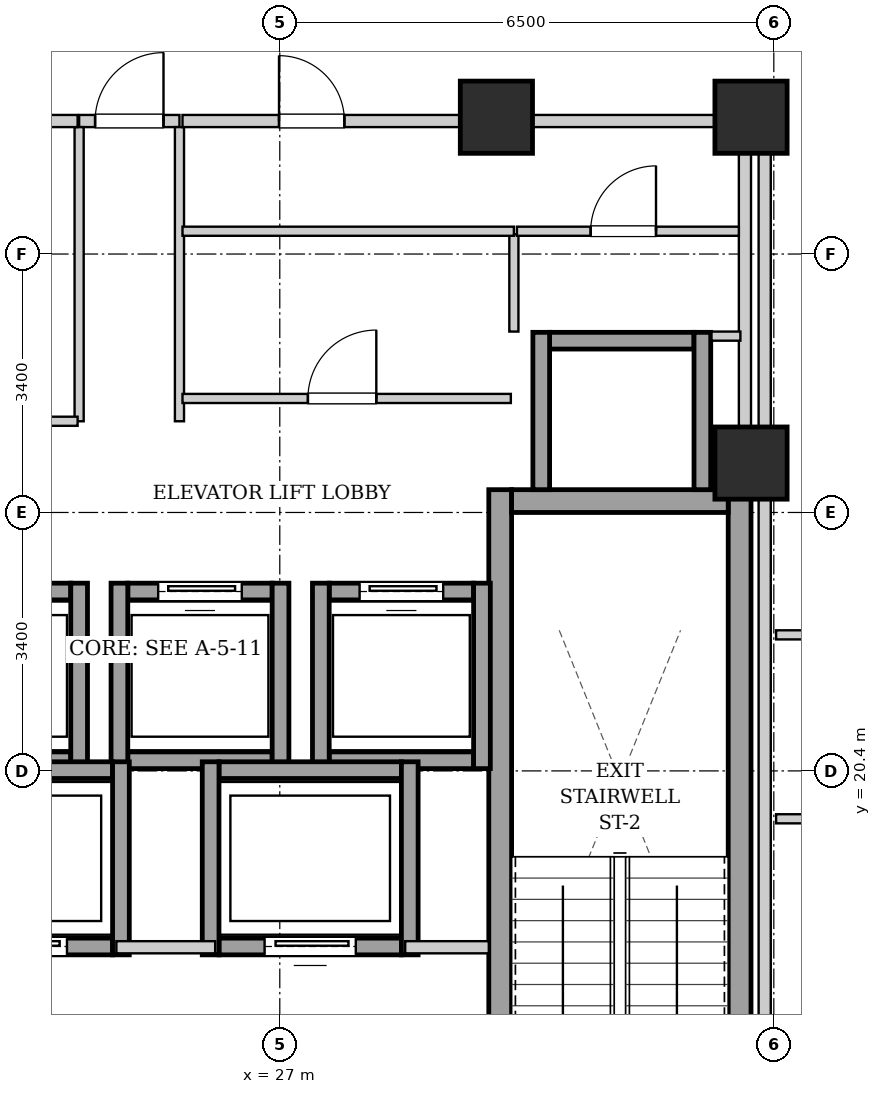
"""IFC4 building model, lengths in metres.
Left out: names, types, materials, properties, quantities, classifications, styles, units other than length and angle.
Written with IfcOpenShell. Run it as: python <this file> out.ifc"""

import sys

from ifc_helpers import new_model, si_unit, direction, frame, frame_2d, origin, origin_2d, place, context, subcontext, project, spatial, rectangle, extrude, element, fill, save


model = new_model("IFC4")
c1 = context("Model", 3, precision=1e-05, world=origin(), true_north=direction((0.0, 1.0)))
c2 = subcontext(c1, "Body", "Model", "MODEL_VIEW")
j1 = project(units=[si_unit("LENGTHUNIT", "METRE"), si_unit("PLANEANGLEUNIT", "RADIAN")], contexts=[c1])
p1 = place(None, origin())
s1 = spatial("IfcSite", under=j1, at=p1, CompositionType="ELEMENT")
p2 = place(p1, origin())
s2 = spatial("IfcBuilding", under=s1, at=p2, CompositionType="ELEMENT")
p3 = place(p2, frame((0.0, 0.0, 140.65)))
s3 = spatial("IfcBuildingStorey", under=s2, at=p3, CompositionType="ELEMENT", Elevation=140.65)
for number, where, z_axis, x_axis in (
    (1, (29.85, 29.0, 0.0), (0.0, 0.0, 1.0), (1.0, 0.0, 0.0)),
    (2, (33.2, 29.0, 0.0), (0.0, 0.0, 1.0), (1.0, 0.0, 0.0)),
    (3, (33.2, 24.45, 0.0), (0.0, 0.0, 1.0), (1.0, 0.0, 0.0)),
):
    element("IfcColumn", number, at=place(p3, frame(where, z_axis=z_axis, x_axis=x_axis)), inside=s3, PredefinedType="COLUMN", context=c2, shape_type="SweptSolid", body=[
        extrude(rectangle(XDim=0.95, YDim=0.95, at=origin_2d()), origin(), (0.0, 0.0, 1.0), 3.25),
    ])
for number, where, z_axis, x_axis in (
    (4, (29.9, 15.1, 0.0), (0.0, 0.0, 1.0), (0.0, 1.0, 0.0)),
    (5, (33.05, 15.1, 0.0), (0.0, 0.0, 1.0), (0.0, 1.0, 0.0)),
):
    element("IfcWall", number, at=place(p3, frame(where, z_axis=z_axis, x_axis=x_axis)), inside=s3, PredefinedType="SHEAR", context=c2, shape_type="SweptSolid", body=[
        extrude(rectangle(XDim=9.0, YDim=0.3, at=frame_2d((4.5, 0.0))), origin(), (0.0, 0.0, 1.0), 2.99),
    ])
p4 = place(p3, frame((30.05, 23.95, 0.0), z_axis=(0.0, 0.0, 1.0), x_axis=(1.0, 0.0, 0.0)))
e6 = element("IfcWall", 6, at=p4, inside=s3, PredefinedType="SHEAR", context=c2, shape_type="SweptSolid", body=[
    extrude(rectangle(XDim=2.85, YDim=0.3, at=frame_2d((1.425, 0.0))), origin(), (0.0, 0.0, 1.0), 2.99),
])
p5 = place(p3, frame((22.35, 20.54, 0.0), z_axis=(0.0, 0.0, 1.0), x_axis=(1.0, 0.0, 0.0)))
e7 = element("IfcWall", 7, at=p5, inside=s3, PredefinedType="SHEAR", context=c2, shape_type="SweptSolid", body=[
    extrude(rectangle(XDim=1.9, YDim=0.22, at=frame_2d((0.95, 0.0))), origin(), (0.0, 0.0, 1.0), 2.99),
])
p6 = place(p3, frame((22.35, 22.76, 0.0), z_axis=(0.0, 0.0, 1.0), x_axis=(1.0, 0.0, 0.0)))
e8 = element("IfcWall", 8, at=p6, inside=s3, PredefinedType="SHEAR", context=c2, shape_type="SweptSolid", body=[
    extrude(rectangle(XDim=1.9, YDim=0.22, at=frame_2d((0.95, 0.0))), origin(), (0.0, 0.0, 1.0), 2.99),
])
p7 = place(p6, frame((0.4, 0.0, 0.0)))
e9 = element("IfcOpeningElement", 9, at=p7, cuts=e8, PredefinedType="OPENING", context=c2, shape_type="SweptSolid", body=[
    extrude(rectangle(XDim=1.1, YDim=2.15, at=frame_2d((0.55, 1.075))), frame((0.0, 0.12, 0.0), z_axis=(0.0, -1.0, 0.0), x_axis=(1.0, 0.0, 0.0)), (0.0, 0.0, 1.0), 0.24),
])
p8 = place(p3, frame((24.36, 20.43, 0.0), z_axis=(0.0, 0.0, 1.0), x_axis=(0.0, 1.0, 0.0)))
e10 = element("IfcWall", 10, at=p8, inside=s3, PredefinedType="SHEAR", context=c2, shape_type="SweptSolid", body=[
    extrude(rectangle(XDim=2.44, YDim=0.22, at=frame_2d((1.22, 0.0))), origin(), (0.0, 0.0, 1.0), 2.99),
])
p9 = place(p3, frame((25.0, 20.54, 0.0), z_axis=(0.0, 0.0, 1.0), x_axis=(1.0, 0.0, 0.0)))
e11 = element("IfcWall", 11, at=p9, inside=s3, PredefinedType="SHEAR", context=c2, shape_type="SweptSolid", body=[
    extrude(rectangle(XDim=1.9, YDim=0.22, at=frame_2d((0.95, 0.0))), origin(), (0.0, 0.0, 1.0), 2.99),
])
p10 = place(p3, frame((25.0, 22.76, 0.0), z_axis=(0.0, 0.0, 1.0), x_axis=(1.0, 0.0, 0.0)))
e12 = element("IfcWall", 12, at=p10, inside=s3, PredefinedType="SHEAR", context=c2, shape_type="SweptSolid", body=[
    extrude(rectangle(XDim=1.9, YDim=0.22, at=frame_2d((0.95, 0.0))), origin(), (0.0, 0.0, 1.0), 2.99),
])
p11 = place(p10, frame((0.4, 0.0, 0.0)))
e13 = element("IfcOpeningElement", 13, at=p11, cuts=e12, PredefinedType="OPENING", context=c2, shape_type="SweptSolid", body=[
    extrude(rectangle(XDim=1.1, YDim=2.15, at=frame_2d((0.55, 1.075))), frame((0.0, 0.12, 0.0), z_axis=(0.0, -1.0, 0.0), x_axis=(1.0, 0.0, 0.0)), (0.0, 0.0, 1.0), 0.24),
])
for number, where, z_axis, x_axis in (
    (14, (24.89, 20.43, 0.0), (0.0, 0.0, 1.0), (0.0, 1.0, 0.0)),
    (15, (27.01, 20.43, 0.0), (0.0, 0.0, 1.0), (0.0, 1.0, 0.0)),
):
    element("IfcWall", number, at=place(p3, frame(where, z_axis=z_axis, x_axis=x_axis)), inside=s3, PredefinedType="SHEAR", context=c2, shape_type="SweptSolid", body=[
        extrude(rectangle(XDim=2.44, YDim=0.22, at=frame_2d((1.22, 0.0))), origin(), (0.0, 0.0, 1.0), 2.99),
    ])
p12 = place(p3, frame((27.65, 20.54, 0.0), z_axis=(0.0, 0.0, 1.0), x_axis=(1.0, 0.0, 0.0)))
e16 = element("IfcWall", 16, at=p12, inside=s3, PredefinedType="SHEAR", context=c2, shape_type="SweptSolid", body=[
    extrude(rectangle(XDim=1.9, YDim=0.22, at=frame_2d((0.95, 0.0))), origin(), (0.0, 0.0, 1.0), 2.99),
])
p13 = place(p3, frame((27.65, 22.76, 0.0), z_axis=(0.0, 0.0, 1.0), x_axis=(1.0, 0.0, 0.0)))
e17 = element("IfcWall", 17, at=p13, inside=s3, PredefinedType="SHEAR", context=c2, shape_type="SweptSolid", body=[
    extrude(rectangle(XDim=1.9, YDim=0.22, at=frame_2d((0.95, 0.0))), origin(), (0.0, 0.0, 1.0), 2.99),
])
p14 = place(p13, frame((0.4, 0.0, 0.0)))
e18 = element("IfcOpeningElement", 18, at=p14, cuts=e17, PredefinedType="OPENING", context=c2, shape_type="SweptSolid", body=[
    extrude(rectangle(XDim=1.1, YDim=2.15, at=frame_2d((0.55, 1.075))), frame((0.0, 0.12, 0.0), z_axis=(0.0, -1.0, 0.0), x_axis=(1.0, 0.0, 0.0)), (0.0, 0.0, 1.0), 0.24),
])
for number, where, z_axis, x_axis in (
    (19, (27.54, 20.43, 0.0), (0.0, 0.0, 1.0), (0.0, 1.0, 0.0)),
    (20, (29.66, 20.43, 0.0), (0.0, 0.0, 1.0), (0.0, 1.0, 0.0)),
):
    element("IfcWall", number, at=place(p3, frame(where, z_axis=z_axis, x_axis=x_axis)), inside=s3, PredefinedType="SHEAR", context=c2, shape_type="SweptSolid", body=[
        extrude(rectangle(XDim=2.44, YDim=0.22, at=frame_2d((1.22, 0.0))), origin(), (0.0, 0.0, 1.0), 2.99),
    ])
p15 = place(p3, frame((30.55, 26.06, 0.0), z_axis=(0.0, 0.0, 1.0), x_axis=(1.0, 0.0, 0.0)))
e21 = element("IfcWall", 21, at=p15, inside=s3, PredefinedType="SHEAR", context=c2, shape_type="SweptSolid", body=[
    extrude(rectangle(XDim=1.9, YDim=0.22, at=frame_2d((0.95, 0.0))), origin(), (0.0, 0.0, 1.0), 2.99),
])
for number, where, z_axis, x_axis in (
    (22, (30.44, 24.1, 0.0), (0.0, 0.0, 1.0), (0.0, 1.0, 0.0)),
    (23, (32.56, 24.1, 0.0), (0.0, 0.0, 1.0), (0.0, 1.0, 0.0)),
):
    element("IfcWall", number, at=place(p3, frame(where, z_axis=z_axis, x_axis=x_axis)), inside=s3, PredefinedType="SHEAR", context=c2, shape_type="SweptSolid", body=[
        extrude(rectangle(XDim=2.07, YDim=0.22, at=frame_2d((1.035, 0.0))), origin(), (0.0, 0.0, 1.0), 2.99),
    ])
p16 = place(p3, frame((22.4, 18.09, 0.0), z_axis=(0.0, 0.0, 1.0), x_axis=(1.0, 0.0, 0.0)))
e24 = element("IfcWall", 24, at=p16, inside=s3, PredefinedType="SHEAR", context=c2, shape_type="SweptSolid", body=[
    extrude(rectangle(XDim=2.4, YDim=0.22, at=frame_2d((1.2, 0.0))), origin(), (0.0, 0.0, 1.0), 2.99),
])
p17 = place(p16, frame((0.6, 0.0, 0.0)))
e25 = element("IfcOpeningElement", 25, at=p17, cuts=e24, PredefinedType="OPENING", context=c2, shape_type="SweptSolid", body=[
    extrude(rectangle(XDim=1.2, YDim=2.15, at=frame_2d((0.6, 1.075))), frame((0.0, 0.12, 0.0), z_axis=(0.0, -1.0, 0.0), x_axis=(1.0, 0.0, 0.0)), (0.0, 0.0, 1.0), 0.24),
])
p18 = place(p3, frame((22.4, 20.41, 0.0), z_axis=(0.0, 0.0, 1.0), x_axis=(1.0, 0.0, 0.0)))
e26 = element("IfcWall", 26, at=p18, inside=s3, PredefinedType="SHEAR", context=c2, shape_type="SweptSolid", body=[
    extrude(rectangle(XDim=2.4, YDim=0.22, at=frame_2d((1.2, 0.0))), origin(), (0.0, 0.0, 1.0), 2.99),
])
p19 = place(p3, frame((24.91, 17.98, 0.0), z_axis=(0.0, 0.0, 1.0), x_axis=(0.0, 1.0, 0.0)))
e27 = element("IfcWall", 27, at=p19, inside=s3, PredefinedType="SHEAR", context=c2, shape_type="SweptSolid", body=[
    extrude(rectangle(XDim=2.54, YDim=0.22, at=frame_2d((1.27, 0.0))), origin(), (0.0, 0.0, 1.0), 2.99),
])
p20 = place(p3, frame((26.2, 18.09, 0.0), z_axis=(0.0, 0.0, 1.0), x_axis=(1.0, 0.0, 0.0)))
e28 = element("IfcWall", 28, at=p20, inside=s3, PredefinedType="SHEAR", context=c2, shape_type="SweptSolid", body=[
    extrude(rectangle(XDim=2.4, YDim=0.22, at=frame_2d((1.2, 0.0))), origin(), (0.0, 0.0, 1.0), 2.99),
])
p21 = place(p20, frame((0.6, 0.0, 0.0)))
e29 = element("IfcOpeningElement", 29, at=p21, cuts=e28, PredefinedType="OPENING", context=c2, shape_type="SweptSolid", body=[
    extrude(rectangle(XDim=1.2, YDim=2.15, at=frame_2d((0.6, 1.075))), frame((0.0, 0.12, 0.0), z_axis=(0.0, -1.0, 0.0), x_axis=(1.0, 0.0, 0.0)), (0.0, 0.0, 1.0), 0.24),
])
p22 = place(p3, frame((26.2, 20.41, 0.0), z_axis=(0.0, 0.0, 1.0), x_axis=(1.0, 0.0, 0.0)))
e30 = element("IfcWall", 30, at=p22, inside=s3, PredefinedType="SHEAR", context=c2, shape_type="SweptSolid", body=[
    extrude(rectangle(XDim=2.4, YDim=0.22, at=frame_2d((1.2, 0.0))), origin(), (0.0, 0.0, 1.0), 2.99),
])
for number, where, z_axis, x_axis in (
    (31, (26.09, 17.98, 0.0), (0.0, 0.0, 1.0), (0.0, 1.0, 0.0)),
    (32, (28.71, 17.98, 0.0), (0.0, 0.0, 1.0), (0.0, 1.0, 0.0)),
):
    element("IfcWall", number, at=place(p3, frame(where, z_axis=z_axis, x_axis=x_axis)), inside=s3, PredefinedType="SHEAR", context=c2, shape_type="SweptSolid", body=[
        extrude(rectangle(XDim=2.54, YDim=0.22, at=frame_2d((1.27, 0.0))), origin(), (0.0, 0.0, 1.0), 2.99),
    ])
p23 = place(p3, frame((24.85, 18.08, 0.0), z_axis=(0.0, 0.0, 1.0), x_axis=(1.0, 0.0, 0.0)))
e33 = element("IfcWall", 33, at=p23, inside=s3, PredefinedType="PARTITIONING", context=c2, shape_type="SweptSolid", body=[
    extrude(rectangle(XDim=1.3, YDim=0.16, at=frame_2d((0.65, 0.0))), origin(), (0.0, 0.0, 1.0), 2.99),
])
p24 = place(p3, frame((28.65, 18.08, 0.0), z_axis=(0.0, 0.0, 1.0), x_axis=(1.0, 0.0, 0.0)))
e34 = element("IfcWall", 34, at=p24, inside=s3, PredefinedType="PARTITIONING", context=c2, shape_type="SweptSolid", body=[
    extrude(rectangle(XDim=1.1, YDim=0.16, at=frame_2d((0.55, 0.0))), origin(), (0.0, 0.0, 1.0), 2.99),
])
p25 = place(p3, frame((33.12, 24.12, 0.0), z_axis=(0.0, 0.0, 1.0), x_axis=(0.0, 1.0, 0.0)))
e35 = element("IfcWall", 35, at=p25, inside=s3, PredefinedType="PARTITIONING", context=c2, shape_type="SweptSolid", body=[
    extrude(rectangle(XDim=4.76, YDim=0.16, at=frame_2d((2.38, 0.0))), origin(), (0.0, 0.0, 1.0), 2.99),
])
p26 = place(p3, frame((24.36, 28.95, 0.0), z_axis=(0.0, 0.0, 1.0), x_axis=(1.0, 0.0, 0.0)))
e36 = element("IfcWall", 36, at=p26, inside=s3, PredefinedType="PARTITIONING", context=c2, shape_type="SweptSolid", body=[
    extrude(rectangle(XDim=1.32, YDim=0.16, at=frame_2d((0.66, 0.0))), origin(), (0.0, 0.0, 1.0), 2.426),
])
p27 = place(p26, frame((0.21, 0.0, 0.0)))
e37 = element("IfcOpeningElement", 37, at=p27, cuts=e36, PredefinedType="OPENING", context=c2, shape_type="SweptSolid", body=[
    extrude(rectangle(XDim=0.9, YDim=2.05, at=frame_2d((0.45, 1.025))), frame((0.0, 0.09, 0.0), z_axis=(0.0, -1.0, 0.0), x_axis=(1.0, 0.0, 0.0)), (0.0, 0.0, 1.0), 0.18),
])
for number, where, z_axis, x_axis in (
    (38, (24.36, 25.0, 0.0), (0.0, 0.0, 1.0), (0.0, 1.0, 0.0)),
    (39, (25.68, 25.0, 0.0), (0.0, 0.0, 1.0), (0.0, 1.0, 0.0)),
):
    element("IfcWall", number, at=place(p3, frame(where, z_axis=z_axis, x_axis=x_axis)), inside=s3, PredefinedType="PARTITIONING", context=c2, shape_type="SweptSolid", body=[
        extrude(rectangle(XDim=3.87, YDim=0.12, at=frame_2d((1.935, 0.0))), origin(), (0.0, 0.0, 1.0), 2.99),
    ])
p28 = place(p3, frame((30.08, 26.18, 0.0), z_axis=(0.0, 0.0, 1.0), x_axis=(0.0, 1.0, 0.0)))
e40 = element("IfcWall", 40, at=p28, inside=s3, PredefinedType="PARTITIONING", context=c2, shape_type="SweptSolid", body=[
    extrude(rectangle(XDim=1.28, YDim=0.12, at=frame_2d((0.64, 0.0))), origin(), (0.0, 0.0, 1.0), 2.99),
])
p29 = place(p3, frame((32.68, 26.12, 0.0), z_axis=(0.0, 0.0, 1.0), x_axis=(1.0, 0.0, 0.0)))
e41 = element("IfcWall", 41, at=p29, inside=s3, PredefinedType="PARTITIONING", context=c2, shape_type="SweptSolid", body=[
    extrude(rectangle(XDim=0.38, YDim=0.12, at=frame_2d((0.19, 0.0))), origin(), (0.0, 0.0, 1.0), 2.99),
])
p30 = place(p3, frame((30.12, 27.5, 0.0), z_axis=(0.0, 0.0, 1.0), x_axis=(1.0, 0.0, 0.0)))
e42 = element("IfcWall", 42, at=p30, inside=s3, PredefinedType="PARTITIONING", context=c2, shape_type="SweptSolid", body=[
    extrude(rectangle(XDim=2.92, YDim=0.12, at=frame_2d((1.46, 0.0))), origin(), (0.0, 0.0, 1.0), 2.99),
])
p31 = place(p30, frame((0.97, 0.0, 0.0)))
e43 = element("IfcOpeningElement", 43, at=p31, cuts=e42, PredefinedType="OPENING", context=c2, shape_type="SweptSolid", body=[
    extrude(rectangle(XDim=0.86, YDim=2.05, at=frame_2d((0.43, 1.025))), frame((0.0, 0.07, 0.0), z_axis=(0.0, -1.0, 0.0), x_axis=(1.0, 0.0, 0.0)), (0.0, 0.0, 1.0), 0.14),
])
p32 = place(p3, frame((22.3, 25.0, 0.0), z_axis=(0.0, 0.0, 1.0), x_axis=(1.0, 0.0, 0.0)))
e44 = element("IfcWall", 44, at=p32, inside=s3, PredefinedType="PARTITIONING", context=c2, shape_type="SweptSolid", body=[
    extrude(rectangle(XDim=2.04, YDim=0.12, at=frame_2d((1.02, 0.0))), origin(), (0.0, 0.0, 1.0), 2.99),
])
p33 = place(p3, frame((22.28, 28.95, 0.0), z_axis=(0.0, 0.0, 1.0), x_axis=(1.0, 0.0, 0.0)))
e45 = element("IfcWall", 45, at=p33, inside=s3, PredefinedType="PARTITIONING", context=c2, shape_type="SweptSolid", body=[
    extrude(rectangle(XDim=2.06, YDim=0.16, at=frame_2d((1.03, 0.0))), origin(), (0.0, 0.0, 1.0), 2.426),
])
p34 = place(p33, frame((0.62, 0.0, 0.0)))
e46 = element("IfcOpeningElement", 46, at=p34, cuts=e45, PredefinedType="OPENING", context=c2, shape_type="SweptSolid", body=[
    extrude(rectangle(XDim=0.86, YDim=2.05, at=frame_2d((0.43, 1.025))), frame((0.0, 0.09, 0.0), z_axis=(0.0, -1.0, 0.0), x_axis=(1.0, 0.0, 0.0)), (0.0, 0.0, 1.0), 0.18),
])
p35 = place(p3, frame((25.72, 27.5, 0.0), z_axis=(0.0, 0.0, 1.0), x_axis=(1.0, 0.0, 0.0)))
e47 = element("IfcWall", 47, at=p35, inside=s3, PredefinedType="PARTITIONING", context=c2, shape_type="SweptSolid", body=[
    extrude(rectangle(XDim=4.36, YDim=0.12, at=frame_2d((2.18, 0.0))), origin(), (0.0, 0.0, 1.0), 2.99),
])
p36 = place(p3, frame((25.72, 25.3, 0.0), z_axis=(0.0, 0.0, 1.0), x_axis=(1.0, 0.0, 0.0)))
e48 = element("IfcWall", 48, at=p36, inside=s3, PredefinedType="PARTITIONING", context=c2, shape_type="SweptSolid", body=[
    extrude(rectangle(XDim=4.32, YDim=0.12, at=frame_2d((2.16, 0.0))), origin(), (0.0, 0.0, 1.0), 2.99),
])
p37 = place(p36, frame((1.65, 0.0, 0.0)))
e49 = element("IfcOpeningElement", 49, at=p37, cuts=e48, PredefinedType="OPENING", context=c2, shape_type="SweptSolid", body=[
    extrude(rectangle(XDim=0.9, YDim=2.05, at=frame_2d((0.45, 1.025))), frame((0.0, 0.07, 0.0), z_axis=(0.0, -1.0, 0.0), x_axis=(1.0, 0.0, 0.0)), (0.0, 0.0, 1.0), 0.14),
])
p38 = place(p3, frame((25.72, 28.95, 0.0), z_axis=(0.0, 0.0, 1.0), x_axis=(1.0, 0.0, 0.0)))
e50 = element("IfcWall", 50, at=p38, inside=s3, PredefinedType="PARTITIONING", context=c2, shape_type="SweptSolid", body=[
    extrude(rectangle(XDim=7.32, YDim=0.16, at=frame_2d((3.66, 0.0))), origin(), (0.0, 0.0, 1.0), 2.426),
])
p39 = place(p38, frame((1.27, 0.0, 0.0)))
e51 = element("IfcOpeningElement", 51, at=p39, cuts=e50, PredefinedType="OPENING", context=c2, shape_type="SweptSolid", body=[
    extrude(rectangle(XDim=0.86, YDim=2.05, at=frame_2d((0.43, 1.025))), frame((0.0, 0.09, 0.0), z_axis=(0.0, -1.0, 0.0), x_axis=(1.0, 0.0, 0.0)), (0.0, 0.0, 1.0), 0.18),
])
p40 = place(p3, frame((33.53, 22.19, 0.0), z_axis=(0.0, 0.0, 1.0), x_axis=(1.0, 0.0, 0.0)))
e52 = element("IfcWall", 52, at=p40, inside=s3, PredefinedType="PARTITIONING", context=c2, shape_type="SweptSolid", body=[
    extrude(rectangle(XDim=2.45, YDim=0.12, at=frame_2d((1.225, 0.0))), origin(), (0.0, 0.0, 1.0), 2.99),
])
p41 = place(p3, frame((33.53, 19.77, 0.0), z_axis=(0.0, 0.0, 1.0), x_axis=(1.0, 0.0, 0.0)))
e53 = element("IfcWall", 53, at=p41, inside=s3, PredefinedType="PARTITIONING", context=c2, shape_type="SweptSolid", body=[
    extrude(rectangle(XDim=2.45, YDim=0.12, at=frame_2d((1.225, 0.0))), origin(), (0.0, 0.0, 1.0), 2.99),
])
p42 = place(p41, frame((0.795, 0.0, 0.0)))
e54 = element("IfcOpeningElement", 54, at=p42, cuts=e53, PredefinedType="OPENING", context=c2, shape_type="SweptSolid", body=[
    extrude(rectangle(XDim=0.86, YDim=2.05, at=frame_2d((0.43, 1.025))), frame((0.0, 0.07, 0.0), z_axis=(0.0, -1.0, 0.0), x_axis=(1.0, 0.0, 0.0)), (0.0, 0.0, 1.0), 0.14),
])
p43 = place(p3, frame((33.38, 15.02, 0.0), z_axis=(0.0, 0.0, 1.0), x_axis=(0.0, 1.0, 0.0)))
e55 = element("IfcWall", 55, at=p43, inside=s3, PredefinedType="PARTITIONING", context=c2, shape_type="SweptSolid", body=[
    extrude(rectangle(XDim=13.98, YDim=0.16, at=frame_2d((6.99, 0.0))), origin(), (0.0, 0.0, 1.0), 2.99),
])
p44 = place(p11, origin())
e56 = element("IfcDoor", 56, at=p44, inside=s3, OperationType="SLIDING_TO_LEFT", PredefinedType="DOOR", context=c2, shape_type="SweptSolid", body=[
    extrude(rectangle(XDim=1.1, YDim=2.15, at=frame_2d((0.55, 1.075))), frame((0.0, 0.025, 0.0), z_axis=(0.0, -1.0, 0.0), x_axis=(1.0, 0.0, 0.0)), (0.0, 0.0, 1.0), 0.05),
])
fill(e13, e56)
p45 = place(p14, origin())
e57 = element("IfcDoor", 57, at=p45, inside=s3, OperationType="SLIDING_TO_LEFT", PredefinedType="DOOR", context=c2, shape_type="SweptSolid", body=[
    extrude(rectangle(XDim=1.1, YDim=2.15, at=frame_2d((0.55, 1.075))), frame((0.0, 0.025, 0.0), z_axis=(0.0, -1.0, 0.0), x_axis=(1.0, 0.0, 0.0)), (0.0, 0.0, 1.0), 0.05),
])
fill(e18, e57)
p46 = place(p17, origin())
e58 = element("IfcDoor", 58, at=p46, inside=s3, OperationType="SLIDING_TO_LEFT", PredefinedType="DOOR", context=c2, shape_type="SweptSolid", body=[
    extrude(rectangle(XDim=1.2, YDim=2.15, at=frame_2d((0.6, 1.075))), frame((0.0, 0.025, 0.0), z_axis=(0.0, -1.0, 0.0), x_axis=(1.0, 0.0, 0.0)), (0.0, 0.0, 1.0), 0.05),
])
fill(e25, e58)
p47 = place(p21, origin())
e59 = element("IfcDoor", 59, at=p47, inside=s3, OperationType="SLIDING_TO_LEFT", PredefinedType="DOOR", context=c2, shape_type="SweptSolid", body=[
    extrude(rectangle(XDim=1.2, YDim=2.15, at=frame_2d((0.6, 1.075))), frame((0.0, 0.025, 0.0), z_axis=(0.0, -1.0, 0.0), x_axis=(1.0, 0.0, 0.0)), (0.0, 0.0, 1.0), 0.05),
])
fill(e29, e59)
p48 = place(p27, origin())
e60 = element("IfcDoor", 60, at=p48, inside=s3, OperationType="SINGLE_SWING_RIGHT", PredefinedType="DOOR", context=c2, shape_type="SweptSolid", body=[
    extrude(rectangle(XDim=0.9, YDim=2.05, at=frame_2d((0.45, 1.025))), frame((0.0, 0.025, 0.0), z_axis=(0.0, -1.0, 0.0), x_axis=(1.0, 0.0, 0.0)), (0.0, 0.0, 1.0), 0.05),
])
fill(e37, e60)
p49 = place(p31, origin())
e61 = element("IfcDoor", 61, at=p49, inside=s3, OperationType="SINGLE_SWING_RIGHT", PredefinedType="DOOR", context=c2, shape_type="SweptSolid", body=[
    extrude(rectangle(XDim=0.86, YDim=2.05, at=frame_2d((0.43, 1.025))), frame((0.0, 0.025, 0.0), z_axis=(0.0, -1.0, 0.0), x_axis=(1.0, 0.0, 0.0)), (0.0, 0.0, 1.0), 0.05),
])
fill(e43, e61)
p50 = place(p37, origin())
e62 = element("IfcDoor", 62, at=p50, inside=s3, OperationType="SINGLE_SWING_RIGHT", PredefinedType="DOOR", context=c2, shape_type="SweptSolid", body=[
    extrude(rectangle(XDim=0.9, YDim=2.05, at=frame_2d((0.45, 1.025))), frame((0.0, 0.025, 0.0), z_axis=(0.0, -1.0, 0.0), x_axis=(1.0, 0.0, 0.0)), (0.0, 0.0, 1.0), 0.05),
])
fill(e49, e62)
p51 = place(p39, origin())
e63 = element("IfcDoor", 63, at=p51, inside=s3, OperationType="SINGLE_SWING_LEFT", PredefinedType="DOOR", context=c2, shape_type="SweptSolid", body=[
    extrude(rectangle(XDim=0.86, YDim=2.05, at=frame_2d((0.43, 1.025))), frame((0.0, 0.025, 0.0), z_axis=(0.0, -1.0, 0.0), x_axis=(1.0, 0.0, 0.0)), (0.0, 0.0, 1.0), 0.05),
])
fill(e51, e63)
save(model, sys.argv[1])
